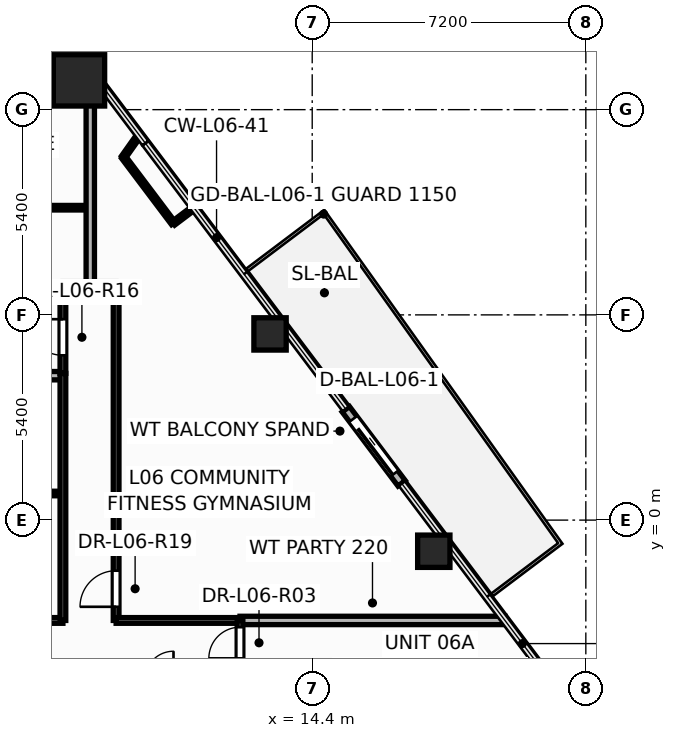
"""IFC4 building model, lengths in metres.
Left out: names, types, materials, properties, quantities, classifications, styles, units other than length and angle.
Written with IfcOpenShell. Run it as: python <this file> out.ifc"""

import sys

from ifc_helpers import new_model, si_unit, direction, frame, frame_2d, origin, origin_2d, place, context, subcontext, project, spatial, rectangle, hollow_rectangle, hollow_circle, extrude, element, fill, save


model = new_model("IFC4")
c1 = context("Model", 3, precision=1e-05, world=origin(), true_north=direction((0.0, 1.0)))
c2 = subcontext(c1, "Body", "Model", "MODEL_VIEW")
j1 = project(units=[si_unit("LENGTHUNIT", "METRE"), si_unit("PLANEANGLEUNIT", "RADIAN")], contexts=[c1])
p1 = place(None, origin())
s1 = spatial("IfcSite", under=j1, at=p1, CompositionType="ELEMENT")
p2 = place(p1, origin())
s2 = spatial("IfcBuilding", under=s1, at=p2, CompositionType="ELEMENT")
p3 = place(p2, frame((0.0, 0.0, 27.9)))
s3 = spatial("IfcBuildingStorey", under=s2, at=p3, CompositionType="ELEMENT", Elevation=27.9)
p4 = place(p3, frame((8.263, 11.57, 0.0), z_axis=(0.0, 0.0, 1.0), x_axis=(1.0, 0.0, 0.0)))
e1 = element("IfcColumn", 1, at=p4, inside=s3, PredefinedType="COLUMN", context=c2, shape_type="SweptSolid", body=[
    extrude(hollow_rectangle(XDim=1.35, YDim=1.35, WallThickness=0.065, at=origin_2d()), origin(), (0.0, 0.0, 1.0), 3.6),
])
for number, where, z_axis, x_axis in (
    (2, (17.599, -0.819, 0.0), (0.0, 0.0, 1.0), (1.0, 0.0, 0.0)),
    (3, (13.29, 4.899, 0.0), (0.0, 0.0, 1.0), (1.0, 0.0, 0.0)),
):
    element("IfcColumn", number, at=place(p3, frame(where, z_axis=z_axis, x_axis=x_axis)), inside=s3, PredefinedType="COLUMN", context=c2, shape_type="SweptSolid", body=[
        extrude(hollow_circle(Radius=0.425, WallThickness=0.038, at=origin_2d()), origin(), (0.0, 0.0, 1.0), 3.6),
    ])
p5 = place(p3, frame((16.753, 0.969, -0.015), z_axis=(0.0, 0.0, 1.0), x_axis=(-0.601871511513, 0.798592939882, 0.0)))
e4 = element("IfcWall", 4, at=p5, inside=s3, PredefinedType="STANDARD", context=c2, shape_type="SweptSolid", body=[
    extrude(rectangle(XDim=2.44, YDim=0.24, at=frame_2d((1.22, 0.0))), origin(), (0.0, 0.0, 1.0), 2.728),
])
p6 = place(p5, frame((0.32, 0.0, 0.015)))
e5 = element("IfcOpeningElement", 5, at=p6, cuts=e4, PredefinedType="OPENING", context=c2, shape_type="SweptSolid", body=[
    extrude(rectangle(XDim=1.806, YDim=2.204, at=frame_2d((0.9, 1.102))), frame((0.0, 0.13, 0.0), z_axis=(0.0, -1.0, 0.0), x_axis=(1.0, 0.0, 0.0)), (0.0, 0.0, 1.0), 0.26),
])
p7 = place(p3, frame((-5.32, -2.64, 0.0), z_axis=(0.0, 0.0, 1.0), x_axis=(1.0, 0.0, 0.0)))
e6 = element("IfcWall", 6, at=p7, inside=s3, PredefinedType="PARTITIONING", context=c2, shape_type="SweptSolid", body=[
    extrude(rectangle(XDim=13.16, YDim=0.15, at=frame_2d((6.58, 0.0))), origin(), (0.0, 0.0, 1.0), 2.325),
])
p8 = place(p7, frame((0.439, 0.0, 0.0)))
e7 = element("IfcOpeningElement", 7, at=p8, cuts=e6, PredefinedType="OPENING", context=c2, shape_type="SweptSolid", body=[
    extrude(rectangle(XDim=0.956, YDim=2.104, at=frame_2d((0.475, 1.052))), frame((0.0, 0.085, 0.0), z_axis=(0.0, -1.0, 0.0), x_axis=(1.0, 0.0, 0.0)), (0.0, 0.0, 1.0), 0.17),
])
p9 = place(p3, frame((9.24, -2.64, 0.0), z_axis=(0.0, 0.0, 1.0), x_axis=(0.0, 1.0, 0.0)))
e8 = element("IfcWall", 8, at=p9, inside=s3, PredefinedType="PARTITIONING", context=c2, shape_type="SweptSolid", body=[
    extrude(rectangle(XDim=8.84, YDim=0.15, at=frame_2d((4.42, 0.0))), origin(), (0.0, 0.0, 1.0), 2.509),
])
p10 = place(p9, frame((0.359, 0.0, 0.0)))
e9 = element("IfcOpeningElement", 9, at=p10, cuts=e8, PredefinedType="OPENING", context=c2, shape_type="SweptSolid", body=[
    extrude(rectangle(XDim=0.956, YDim=2.104, at=frame_2d((0.475, 1.052))), frame((0.0, 0.085, 0.0), z_axis=(0.0, -1.0, 0.0), x_axis=(1.0, 0.0, 0.0)), (0.0, 0.0, 1.0), 0.17),
])
p11 = place(p3, frame((1.362, 8.22, 0.0), z_axis=(0.0, 0.0, 1.0), x_axis=(1.0, 0.0, 0.0)))
e10 = element("IfcWall", 10, at=p11, inside=s3, PredefinedType="PARTITIONING", context=c2, shape_type="SweptSolid", body=[
    extrude(rectangle(XDim=7.198, YDim=0.12, at=frame_2d((3.599, 0.0))), origin(), (0.0, 0.0, 1.0), 2.509),
])
p12 = place(p3, frame((0.84, 0.7, 0.0), z_axis=(0.0, 0.0, 1.0), x_axis=(1.0, 0.0, 0.0)))
e11 = element("IfcWall", 11, at=p12, inside=s3, PredefinedType="PARTITIONING", context=c2, shape_type="SweptSolid", body=[
    extrude(rectangle(XDim=7.0, YDim=0.12, at=frame_2d((3.5, 0.0))), origin(), (0.0, 0.0, 1.0), 2.325),
])
p13 = place(p12, frame((0.478, 0.0, 0.0)))
e12 = element("IfcOpeningElement", 12, at=p13, cuts=e11, PredefinedType="OPENING", context=c2, shape_type="SweptSolid", body=[
    extrude(rectangle(XDim=0.926, YDim=2.104, at=frame_2d((0.46, 1.052))), frame((0.0, 0.07, 0.0), z_axis=(0.0, -1.0, 0.0), x_axis=(1.0, 0.0, 0.0)), (0.0, 0.0, 1.0), 0.14),
])
p14 = place(p3, frame((12.5, -2.64, 0.0), z_axis=(0.0, 0.0, 1.0), x_axis=(1.0, 0.0, 0.0)))
e13 = element("IfcWall", 13, at=p14, inside=s3, PredefinedType="PARTITIONING", context=c2, shape_type="SweptSolid", body=[
    extrude(rectangle(XDim=6.972, YDim=0.22, at=frame_2d((3.486, 0.0))), origin(), (0.0, 0.0, 1.0), 2.713),
])
p15 = place(p3, frame((-6.0, 3.8, 0.0), z_axis=(0.0, 0.0, 1.0), x_axis=(1.0, 0.0, 0.0)))
e14 = element("IfcWall", 14, at=p15, inside=s3, PredefinedType="PARTITIONING", context=c2, shape_type="SweptSolid", body=[
    extrude(rectangle(XDim=13.84, YDim=0.22, at=frame_2d((6.92, 0.0))), origin(), (0.0, 0.0, 1.0), 2.325),
])
p16 = place(p3, frame((8.56, 6.2, 0.0), z_axis=(0.0, 0.0, 1.0), x_axis=(0.0, 1.0, 0.0)))
e15 = element("IfcWall", 15, at=p16, inside=s3, PredefinedType="PARTITIONING", context=c2, shape_type="SweptSolid", body=[
    extrude(rectangle(XDim=5.641, YDim=0.22, at=frame_2d((2.821, 0.0))), origin(), (0.0, 0.0, 1.0), 2.509),
])
p17 = place(p3, frame((7.84, -2.64, 0.0), z_axis=(0.0, 0.0, 1.0), x_axis=(0.0, 1.0, 0.0)))
e16 = element("IfcWall", 16, at=p17, inside=s3, PredefinedType="PARTITIONING", context=c2, shape_type="SweptSolid", body=[
    extrude(rectangle(XDim=6.5, YDim=0.15, at=frame_2d((3.25, 0.0))), origin(), (0.0, 0.0, 1.0), 2.509),
])
p18 = place(p3, frame((9.24, -2.64, 0.0), z_axis=(0.0, 0.0, 1.0), x_axis=(1.0, 0.0, 0.0)))
e17 = element("IfcWall", 17, at=p18, inside=s3, PredefinedType="PARTITIONING", context=c2, shape_type="SweptSolid", body=[
    extrude(rectangle(XDim=3.26, YDim=0.15, at=frame_2d((1.63, 0.0))), origin(), (0.0, 0.0, 1.0), 3.35),
])
p19 = place(p3, frame((7.84, 3.862, 0.0), z_axis=(0.0, 0.0, 1.0), x_axis=(0.0, 1.0, 0.0)))
e18 = element("IfcWall", 18, at=p19, inside=s3, PredefinedType="PARTITIONING", context=c2, shape_type="SweptSolid", body=[
    extrude(rectangle(XDim=2.338, YDim=0.15, at=frame_2d((1.169, 0.0))), origin(), (0.0, 0.0, 1.0), 3.35),
])
p20 = place(p19, frame((0.474, 0.0, 0.0)))
e19 = element("IfcOpeningElement", 19, at=p20, cuts=e18, PredefinedType="OPENING", context=c2, shape_type="SweptSolid", body=[
    extrude(rectangle(XDim=0.956, YDim=2.104, at=frame_2d((0.475, 1.052))), frame((0.0, 0.085, 0.0), z_axis=(0.0, -1.0, 0.0), x_axis=(1.0, 0.0, 0.0)), (0.0, 0.0, 1.0), 0.17),
])
p21 = place(p3, frame((10.746, 7.81, 0.0), z_axis=(0.0, 0.0, 1.0), x_axis=(-0.601897859726, 0.798573081475, 0.0)))
e20 = element("IfcWall", 20, at=p21, inside=s3, PredefinedType="PARTITIONING", context=c2, shape_type="SweptSolid", body=[
    extrude(rectangle(XDim=2.18, YDim=0.12, at=frame_2d((1.09, 0.0))), origin(), (0.0, 0.0, 1.0), 3.35),
])
p22 = place(p3, frame((12.5, -4.24, 0.0), z_axis=(0.0, 0.0, 1.0), x_axis=(0.0, 1.0, 0.0)))
e21 = element("IfcWall", 21, at=p22, inside=s3, PredefinedType="PARTITIONING", context=c2, shape_type="SweptSolid", body=[
    extrude(rectangle(XDim=1.6, YDim=0.15, at=frame_2d((0.8, 0.0))), origin(), (0.0, 0.0, 1.0), 2.325),
])
p23 = place(p22, frame((0.602, 0.0, 0.0)))
e22 = element("IfcOpeningElement", 22, at=p23, cuts=e21, PredefinedType="OPENING", context=c2, shape_type="SweptSolid", body=[
    extrude(rectangle(XDim=0.826, YDim=2.104, at=frame_2d((0.41, 1.052))), frame((0.0, 0.085, 0.0), z_axis=(0.0, -1.0, 0.0), x_axis=(1.0, 0.0, 0.0)), (0.0, 0.0, 1.0), 0.17),
])
p24 = place(p3, frame((7.84, 6.2, 0.0), z_axis=(0.0, 0.0, 1.0), x_axis=(1.0, 0.0, 0.0)))
e23 = element("IfcWall", 23, at=p24, inside=s3, PredefinedType="PARTITIONING", context=c2, shape_type="SweptSolid", body=[
    extrude(rectangle(XDim=1.4, YDim=0.15, at=frame_2d((0.7, 0.0))), origin(), (0.0, 0.0, 1.0), 3.35),
])
p25 = place(p3, frame((9.434, 9.551, 0.0), z_axis=(0.0, 0.0, 1.0), x_axis=(0.5781810232, 0.815908514732, 0.0)))
e24 = element("IfcWall", 24, at=p25, inside=s3, PredefinedType="PARTITIONING", context=c2, shape_type="SweptSolid", body=[
    extrude(rectangle(XDim=0.703, YDim=0.12, at=frame_2d((0.352, 0.0))), origin(), (0.0, 0.0, 1.0), 2.713),
])
p26 = place(p3, frame((11.281, 8.213, 0.0), z_axis=(0.0, 0.0, 1.0), x_axis=(-0.798641978857, -0.601806438655, 0.0)))
e25 = element("IfcWall", 25, at=p26, inside=s3, PredefinedType="PARTITIONING", context=c2, shape_type="SweptSolid", body=[
    extrude(rectangle(XDim=0.67, YDim=0.12, at=frame_2d((0.335, 0.0))), origin(), (0.0, 0.0, 1.0), 2.713),
])
p27 = place(p6, origin())
e26 = element("IfcDoor", 26, at=p27, inside=s3, OperationType="SLIDING_TO_LEFT", PredefinedType="DOOR", context=c2, shape_type="SweptSolid", body=[
    extrude(rectangle(XDim=1.8, YDim=2.2, at=frame_2d((0.9, 1.1))), frame((0.0, 0.025, 0.0), z_axis=(0.0, -1.0, 0.0), x_axis=(1.0, 0.0, 0.0)), (0.0, 0.0, 1.0), 0.05),
])
fill(e5, e26)
p28 = place(p23, origin())
e27 = element("IfcDoor", 27, at=p28, inside=s3, OperationType="SINGLE_SWING_LEFT", PredefinedType="DOOR", context=c2, shape_type="SweptSolid", body=[
    extrude(rectangle(XDim=0.82, YDim=2.1, at=frame_2d((0.41, 1.05))), frame((0.0, 0.025, 0.0), z_axis=(0.0, -1.0, 0.0), x_axis=(1.0, 0.0, 0.0)), (0.0, 0.0, 1.0), 0.05),
])
fill(e22, e27)
p29 = place(p20, origin())
e28 = element("IfcDoor", 28, at=p29, inside=s3, OperationType="SINGLE_SWING_RIGHT", PredefinedType="DOOR", context=c2, shape_type="SweptSolid", body=[
    extrude(rectangle(XDim=0.95, YDim=2.1, at=frame_2d((0.475, 1.05))), frame((0.0, 0.025, 0.0), z_axis=(0.0, -1.0, 0.0), x_axis=(1.0, 0.0, 0.0)), (0.0, 0.0, 1.0), 0.05),
])
fill(e19, e28)
p30 = place(p10, origin())
e29 = element("IfcDoor", 29, at=p30, inside=s3, OperationType="SINGLE_SWING_LEFT", PredefinedType="DOOR", context=c2, shape_type="SweptSolid", body=[
    extrude(rectangle(XDim=0.95, YDim=2.1, at=frame_2d((0.475, 1.05))), frame((0.0, 0.025, 0.0), z_axis=(0.0, -1.0, 0.0), x_axis=(1.0, 0.0, 0.0)), (0.0, 0.0, 1.0), 0.05),
])
fill(e9, e29)
save(model, sys.argv[1])
